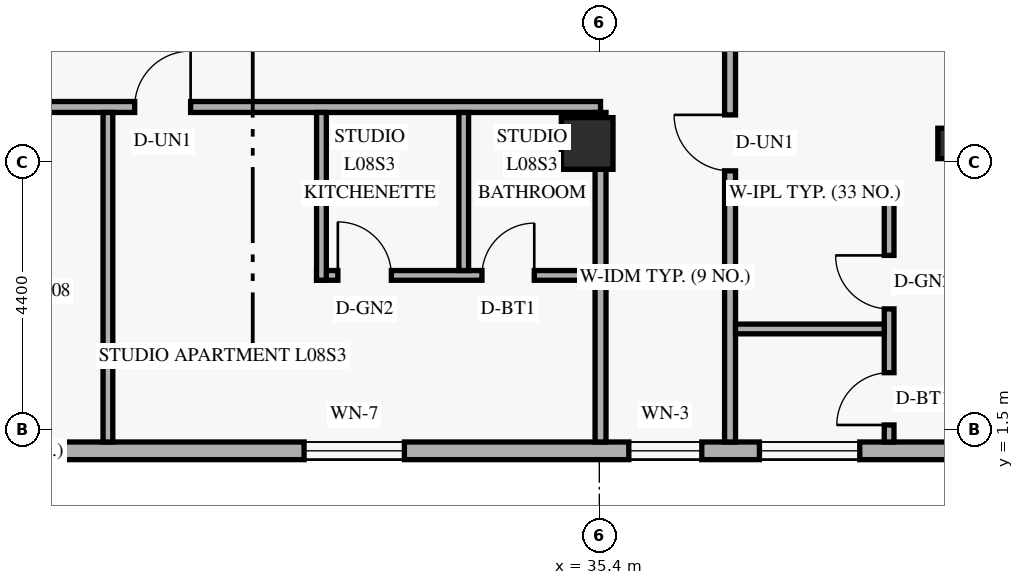
"""IFC4 building model, lengths in metres.
Left out: names, types, materials, properties, quantities, classifications, styles, units other than length and angle.
Written with IfcOpenShell. Run it as: python <this file> out.ifc"""

import sys

from ifc_helpers import new_model, si_unit, direction, frame, frame_2d, origin, origin_2d, place, context, subcontext, project, spatial, rectangle, hollow_rectangle, extrude, element, fill, save


model = new_model("IFC4")
c1 = context("Model", 3, precision=1e-05, world=origin(), true_north=direction((0.0, 1.0)))
c2 = subcontext(c1, "Body", "Model", "MODEL_VIEW")
j1 = project(units=[si_unit("LENGTHUNIT", "METRE"), si_unit("PLANEANGLEUNIT", "RADIAN")], contexts=[c1])
p1 = place(None, origin())
s1 = spatial("IfcSite", under=j1, at=p1, CompositionType="ELEMENT")
p2 = place(p1, origin())
s2 = spatial("IfcBuilding", under=s1, at=p2, CompositionType="ELEMENT")
p3 = place(p2, frame((0.0, 0.0, 34.8)))
s3 = spatial("IfcBuildingStorey", under=s2, at=p3, CompositionType="ELEMENT", Elevation=34.8)
p4 = place(p3, frame((35.2, 6.2, 0.0), z_axis=(0.0, 0.0, 1.0), x_axis=(1.0, 0.0, 0.0)))
e1 = element("IfcColumn", 1, at=p4, inside=s3, PredefinedType="COLUMN", context=c2, shape_type="SweptSolid", body=[
    extrude(rectangle(XDim=0.85, YDim=0.85, at=origin_2d()), origin(), (0.0, 0.0, 1.0), 3.6),
])
p5 = place(p3, frame((41.154, 6.2, 0.0), z_axis=(0.034973505036, 0.0, 0.999388239847), x_axis=(0.0, 1.0, 0.0)))
e2 = element("IfcColumn", 2, at=p5, inside=s3, PredefinedType="COLUMN", context=c2, shape_type="SweptSolid", body=[
    extrude(hollow_rectangle(XDim=0.5, YDim=0.5, WallThickness=0.022, at=origin_2d()), origin(), (0.0, 0.0, 1.0), 3.602),
])
p6 = place(p3, frame((5.42, 1.145, 0.0), z_axis=(0.0, 0.0, 1.0), x_axis=(1.0, 0.0, 0.0)))
e3 = element("IfcWall", 3, at=p6, inside=s3, PredefinedType="SOLIDWALL", context=c2, shape_type="SweptSolid", body=[
    extrude(rectangle(XDim=39.56, YDim=0.29, at=frame_2d((19.78, 0.0))), origin(), (0.0, 0.0, 1.0), 3.36),
])
p7 = place(p6, frame((2.615, 0.0, 0.85)))
e4 = element("IfcOpeningElement", 4, at=p7, cuts=e3, PredefinedType="OPENING", context=c2, shape_type="SweptSolid", body=[
    extrude(rectangle(XDim=1.65, YDim=1.6, at=frame_2d((0.825, 0.8))), frame((0.0, 0.155, 0.0), z_axis=(0.0, -1.0, 0.0), x_axis=(1.0, 0.0, 0.0)), (0.0, 0.0, 1.0), 0.31),
])
p8 = place(p6, frame((7.18, 0.0, 0.85)))
e5 = element("IfcOpeningElement", 5, at=p8, cuts=e3, PredefinedType="OPENING", context=c2, shape_type="SweptSolid", body=[
    extrude(rectangle(XDim=1.2, YDim=1.5, at=frame_2d((0.6, 0.75))), frame((0.0, 0.155, 0.0), z_axis=(0.0, -1.0, 0.0), x_axis=(1.0, 0.0, 0.0)), (0.0, 0.0, 1.0), 0.31),
])
p9 = place(p6, frame((11.906, 0.0, 0.85)))
e6 = element("IfcOpeningElement", 6, at=p9, cuts=e3, PredefinedType="OPENING", context=c2, shape_type="SweptSolid", body=[
    extrude(rectangle(XDim=1.65, YDim=1.6, at=frame_2d((0.825, 0.8))), frame((0.0, 0.155, 0.0), z_axis=(0.0, -1.0, 0.0), x_axis=(1.0, 0.0, 0.0)), (0.0, 0.0, 1.0), 0.31),
])
p10 = place(p6, frame((18.515, 0.0, 0.85)))
e7 = element("IfcOpeningElement", 7, at=p10, cuts=e3, PredefinedType="OPENING", context=c2, shape_type="SweptSolid", body=[
    extrude(rectangle(XDim=1.65, YDim=1.6, at=frame_2d((0.825, 0.8))), frame((0.0, 0.155, 0.0), z_axis=(0.0, -1.0, 0.0), x_axis=(1.0, 0.0, 0.0)), (0.0, 0.0, 1.0), 0.31),
])
p11 = place(p6, frame((25.124, 0.0, 0.85)))
e8 = element("IfcOpeningElement", 8, at=p11, cuts=e3, PredefinedType="OPENING", context=c2, shape_type="SweptSolid", body=[
    extrude(rectangle(XDim=1.65, YDim=1.6, at=frame_2d((0.825, 0.8))), frame((0.0, 0.155, 0.0), z_axis=(0.0, -1.0, 0.0), x_axis=(1.0, 0.0, 0.0)), (0.0, 0.0, 1.0), 0.31),
])
p12 = place(p6, frame((30.465, 0.0, 0.85)))
e9 = element("IfcOpeningElement", 9, at=p12, cuts=e3, PredefinedType="OPENING", context=c2, shape_type="SweptSolid", body=[
    extrude(rectangle(XDim=1.2, YDim=1.5, at=frame_2d((0.6, 0.75))), frame((0.0, 0.155, 0.0), z_axis=(0.0, -1.0, 0.0), x_axis=(1.0, 0.0, 0.0)), (0.0, 0.0, 1.0), 0.31),
])
p13 = place(p6, frame((32.613, 0.0, 0.85)))
e10 = element("IfcOpeningElement", 10, at=p13, cuts=e3, PredefinedType="OPENING", context=c2, shape_type="SweptSolid", body=[
    extrude(rectangle(XDim=1.65, YDim=1.6, at=frame_2d((0.825, 0.8))), frame((0.0, 0.155, 0.0), z_axis=(0.0, -1.0, 0.0), x_axis=(1.0, 0.0, 0.0)), (0.0, 0.0, 1.0), 0.31),
])
p14 = place(p6, frame((36.328, 0.0, 0.85)))
e11 = element("IfcOpeningElement", 11, at=p14, cuts=e3, PredefinedType="OPENING", context=c2, shape_type="SweptSolid", body=[
    extrude(rectangle(XDim=1.65, YDim=1.6, at=frame_2d((0.825, 0.8))), frame((0.0, 0.155, 0.0), z_axis=(0.0, -1.0, 0.0), x_axis=(1.0, 0.0, 0.0)), (0.0, 0.0, 1.0), 0.31),
])
p15 = place(p3, frame((37.55, 1.29, 0.0), z_axis=(0.0, 0.0, 1.0), x_axis=(0.0, 1.0, 0.0)))
e12 = element("IfcWall", 12, at=p15, inside=s3, PredefinedType="STANDARD", context=c2, shape_type="SweptSolid", body=[
    extrude(rectangle(XDim=45.42, YDim=0.18, at=frame_2d((22.71, 0.0))), origin(), (0.0, 0.0, 1.0), 2.649),
])
p16 = place(p15, frame((4.46, 0.0, 0.0)))
e13 = element("IfcOpeningElement", 13, at=p16, cuts=e12, PredefinedType="OPENING", context=c2, shape_type="SweptSolid", body=[
    extrude(rectangle(XDim=0.92, YDim=2.15, at=frame_2d((0.46, 1.075))), frame((0.0, 0.1, 0.0), z_axis=(0.0, -1.0, 0.0), x_axis=(1.0, 0.0, 0.0)), (0.0, 0.0, 1.0), 0.2),
])
p17 = place(p15, frame((15.907, 0.0, 0.0)))
e14 = element("IfcOpeningElement", 14, at=p17, cuts=e12, PredefinedType="OPENING", context=c2, shape_type="SweptSolid", body=[
    extrude(rectangle(XDim=0.92, YDim=2.15, at=frame_2d((0.46, 1.075))), frame((0.0, 0.1, 0.0), z_axis=(0.0, -1.0, 0.0), x_axis=(1.0, 0.0, 0.0)), (0.0, 0.0, 1.0), 0.2),
])
p18 = place(p15, frame((28.23, 0.0, 0.0)))
e15 = element("IfcOpeningElement", 15, at=p18, cuts=e12, PredefinedType="OPENING", context=c2, shape_type="SweptSolid", body=[
    extrude(rectangle(XDim=0.92, YDim=2.15, at=frame_2d((0.46, 1.075))), frame((0.0, 0.1, 0.0), z_axis=(0.0, -1.0, 0.0), x_axis=(1.0, 0.0, 0.0)), (0.0, 0.0, 1.0), 0.2),
])
p19 = place(p15, frame((40.02, 0.0, 0.0)))
e16 = element("IfcOpeningElement", 16, at=p19, cuts=e12, PredefinedType="OPENING", context=c2, shape_type="SweptSolid", body=[
    extrude(rectangle(XDim=0.92, YDim=2.15, at=frame_2d((0.46, 1.075))), frame((0.0, 0.1, 0.0), z_axis=(0.0, -1.0, 0.0), x_axis=(1.0, 0.0, 0.0)), (0.0, 0.0, 1.0), 0.2),
])
p20 = place(p3, frame((14.1, 6.8, 0.0), z_axis=(0.0, 0.0, 1.0), x_axis=(1.0, 0.0, 0.0)))
e17 = element("IfcWall", 17, at=p20, inside=s3, PredefinedType="STANDARD", context=c2, shape_type="SweptSolid", body=[
    extrude(rectangle(XDim=21.32, YDim=0.18, at=frame_2d((10.66, 0.0))), origin(), (0.0, 0.0, 1.0), 2.649),
])
p21 = place(p20, frame((0.44, 0.0, 0.0)))
e18 = element("IfcOpeningElement", 18, at=p21, cuts=e17, PredefinedType="OPENING", context=c2, shape_type="SweptSolid", body=[
    extrude(rectangle(XDim=0.92, YDim=2.15, at=frame_2d((0.46, 1.075))), frame((0.0, 0.1, 0.0), z_axis=(0.0, -1.0, 0.0), x_axis=(1.0, 0.0, 0.0)), (0.0, 0.0, 1.0), 0.2),
])
p22 = place(p20, frame((8.582, 0.0, 0.0)))
e19 = element("IfcOpeningElement", 19, at=p22, cuts=e17, PredefinedType="OPENING", context=c2, shape_type="SweptSolid", body=[
    extrude(rectangle(XDim=0.95, YDim=2.15, at=frame_2d((0.475, 1.075))), frame((0.0, 0.1, 0.0), z_axis=(0.0, -1.0, 0.0), x_axis=(1.0, 0.0, 0.0)), (0.0, 0.0, 1.0), 0.2),
])
p23 = place(p20, frame((13.658, 0.0, 0.0)))
e20 = element("IfcOpeningElement", 20, at=p23, cuts=e17, PredefinedType="OPENING", context=c2, shape_type="SweptSolid", body=[
    extrude(rectangle(XDim=0.92, YDim=2.15, at=frame_2d((0.46, 1.075))), frame((0.0, 0.1, 0.0), z_axis=(0.0, -1.0, 0.0), x_axis=(1.0, 0.0, 0.0)), (0.0, 0.0, 1.0), 0.2),
])
p24 = place(p3, frame((35.42, 1.29, 0.0), z_axis=(0.0, 0.0, 1.0), x_axis=(0.0, 1.0, 0.0)))
e21 = element("IfcWall", 21, at=p24, inside=s3, PredefinedType="PARTITIONING", context=c2, shape_type="SweptSolid", body=[
    extrude(rectangle(XDim=5.42, YDim=0.18, at=frame_2d((2.71, 0.0))), origin(), (0.0, 0.0, 1.0), 3.36),
])
p25 = place(p3, frame((37.64, 5.39, 0.0), z_axis=(0.0, 0.0, 1.0), x_axis=(1.0, 0.0, 0.0)))
e22 = element("IfcWall", 22, at=p25, inside=s3, PredefinedType="PLUMBINGWALL", context=c2, shape_type="SweptSolid", body=[
    extrude(rectangle(XDim=2.606, YDim=0.16, at=frame_2d((1.303, 0.0))), origin(), (0.0, 0.0, 1.0), 3.36),
])
p26 = place(p3, frame((40.166, 1.29, 0.0), z_axis=(0.0, 0.0, 1.0), x_axis=(0.0, 1.0, 0.0)))
e23 = element("IfcWall", 23, at=p26, inside=s3, PredefinedType="PLUMBINGWALL", context=c2, shape_type="SweptSolid", body=[
    extrude(rectangle(XDim=4.19, YDim=0.16, at=frame_2d((2.095, 0.0))), origin(), (0.0, 0.0, 1.0), 3.36),
])
p27 = place(p26, frame((0.28, 0.0, 0.0)))
e24 = element("IfcOpeningElement", 24, at=p27, cuts=e23, PredefinedType="OPENING", context=c2, shape_type="SweptSolid", body=[
    extrude(rectangle(XDim=0.86, YDim=2.12, at=frame_2d((0.43, 1.06))), frame((0.0, 0.09, 0.0), z_axis=(0.0, -1.0, 0.0), x_axis=(1.0, 0.0, 0.0)), (0.0, 0.0, 1.0), 0.18),
])
p28 = place(p26, frame((2.189, 0.0, 0.0)))
e25 = element("IfcOpeningElement", 25, at=p28, cuts=e23, PredefinedType="OPENING", context=c2, shape_type="SweptSolid", body=[
    extrude(rectangle(XDim=0.88, YDim=2.12, at=frame_2d((0.44, 1.06))), frame((0.0, 0.09, 0.0), z_axis=(0.0, -1.0, 0.0), x_axis=(1.0, 0.0, 0.0)), (0.0, 0.0, 1.0), 0.18),
])
p29 = place(p3, frame((37.64, 3.149, 0.0), z_axis=(0.0, 0.0, 1.0), x_axis=(1.0, 0.0, 0.0)))
e26 = element("IfcWall", 26, at=p29, inside=s3, PredefinedType="PLUMBINGWALL", context=c2, shape_type="SweptSolid", body=[
    extrude(rectangle(XDim=2.446, YDim=0.16, at=frame_2d((1.223, 0.0))), origin(), (0.0, 0.0, 1.0), 3.36),
])
p30 = place(p3, frame((27.318, 1.29, 0.0), z_axis=(0.0, 0.0, 1.0), x_axis=(0.0, 1.0, 0.0)))
e27 = element("IfcWall", 27, at=p30, inside=s3, PredefinedType="PARTITIONING", context=c2, shape_type="SweptSolid", body=[
    extrude(rectangle(XDim=5.42, YDim=0.16, at=frame_2d((2.71, 0.0))), origin(), (0.0, 0.0, 1.0), 2.809),
])
p31 = place(p3, frame((30.75, 4.03, 0.0), z_axis=(0.0, 0.0, 1.0), x_axis=(1.0, 0.0, 0.0)))
e28 = element("IfcWall", 28, at=p31, inside=s3, PredefinedType="PLUMBINGWALL", context=c2, shape_type="SweptSolid", body=[
    extrude(rectangle(XDim=4.58, YDim=0.16, at=frame_2d((2.29, 0.0))), origin(), (0.0, 0.0, 1.0), 3.36),
])
p32 = place(p31, frame((0.35, 0.0, 0.0)))
e29 = element("IfcOpeningElement", 29, at=p32, cuts=e28, PredefinedType="OPENING", context=c2, shape_type="SweptSolid", body=[
    extrude(rectangle(XDim=0.88, YDim=2.12, at=frame_2d((0.44, 1.06))), frame((0.0, 0.09, 0.0), z_axis=(0.0, -1.0, 0.0), x_axis=(1.0, 0.0, 0.0)), (0.0, 0.0, 1.0), 0.18),
])
p33 = place(p31, frame((2.72, 0.0, 0.0)))
e30 = element("IfcOpeningElement", 30, at=p33, cuts=e28, PredefinedType="OPENING", context=c2, shape_type="SweptSolid", body=[
    extrude(rectangle(XDim=0.86, YDim=2.12, at=frame_2d((0.43, 1.06))), frame((0.0, 0.09, 0.0), z_axis=(0.0, -1.0, 0.0), x_axis=(1.0, 0.0, 0.0)), (0.0, 0.0, 1.0), 0.18),
])
p34 = place(p3, frame((30.83, 3.95, 0.0), z_axis=(0.0, 0.0, 1.0), x_axis=(0.0, 1.0, 0.0)))
e31 = element("IfcWall", 31, at=p34, inside=s3, PredefinedType="PLUMBINGWALL", context=c2, shape_type="SweptSolid", body=[
    extrude(rectangle(XDim=2.76, YDim=0.16, at=frame_2d((1.38, 0.0))), origin(), (0.0, 0.0, 1.0), 2.809),
])
p35 = place(p3, frame((33.17, 4.11, 0.0), z_axis=(0.0, 0.0, 1.0), x_axis=(0.0, 1.0, 0.0)))
e32 = element("IfcWall", 32, at=p35, inside=s3, PredefinedType="PLUMBINGWALL", context=c2, shape_type="SweptSolid", body=[
    extrude(rectangle(XDim=2.6, YDim=0.16, at=frame_2d((1.3, 0.0))), origin(), (0.0, 0.0, 1.0), 2.809),
])
p36 = place(p11, origin())
e33 = element("IfcWindow", 33, at=p36, inside=s3, PartitioningType="SINGLE_PANEL", PredefinedType="WINDOW", context=c2, shape_type="SweptSolid", body=[
    extrude(rectangle(XDim=1.65, YDim=1.6, at=frame_2d((0.825, 0.8))), frame((0.0, 0.03, 0.0), z_axis=(0.0, -1.0, 0.0), x_axis=(1.0, 0.0, 0.0)), (0.0, 0.0, 1.0), 0.06),
])
fill(e8, e33)
p37 = place(p12, origin())
e34 = element("IfcWindow", 34, at=p37, inside=s3, PartitioningType="SINGLE_PANEL", PredefinedType="WINDOW", context=c2, shape_type="SweptSolid", body=[
    extrude(rectangle(XDim=1.2, YDim=1.5, at=frame_2d((0.6, 0.75))), frame((0.0, 0.03, 0.0), z_axis=(0.0, -1.0, 0.0), x_axis=(1.0, 0.0, 0.0)), (0.0, 0.0, 1.0), 0.06),
])
fill(e9, e34)
p38 = place(p13, origin())
e35 = element("IfcWindow", 35, at=p38, inside=s3, PartitioningType="SINGLE_PANEL", PredefinedType="WINDOW", context=c2, shape_type="SweptSolid", body=[
    extrude(rectangle(XDim=1.65, YDim=1.6, at=frame_2d((0.825, 0.8))), frame((0.0, 0.03, 0.0), z_axis=(0.0, -1.0, 0.0), x_axis=(1.0, 0.0, 0.0)), (0.0, 0.0, 1.0), 0.06),
])
fill(e10, e35)
p39 = place(p16, origin())
e36 = element("IfcDoor", 36, at=p39, inside=s3, OperationType="SINGLE_SWING_RIGHT", PredefinedType="DOOR", context=c2, shape_type="SweptSolid", body=[
    extrude(rectangle(XDim=0.92, YDim=2.15, at=frame_2d((0.46, 1.075))), frame((0.0, 0.025, 0.0), z_axis=(0.0, -1.0, 0.0), x_axis=(1.0, 0.0, 0.0)), (0.0, 0.0, 1.0), 0.05),
])
fill(e13, e36)
p40 = place(p27, origin())
e37 = element("IfcDoor", 37, at=p40, inside=s3, OperationType="SINGLE_SWING_LEFT", PredefinedType="DOOR", context=c2, shape_type="SweptSolid", body=[
    extrude(rectangle(XDim=0.86, YDim=2.12, at=frame_2d((0.43, 1.06))), frame((0.0, 0.025, 0.0), z_axis=(0.0, -1.0, 0.0), x_axis=(1.0, 0.0, 0.0)), (0.0, 0.0, 1.0), 0.05),
])
fill(e24, e37)
p41 = place(p28, origin())
e38 = element("IfcDoor", 38, at=p41, inside=s3, OperationType="SINGLE_SWING_RIGHT", PredefinedType="DOOR", context=c2, shape_type="SweptSolid", body=[
    extrude(rectangle(XDim=0.88, YDim=2.12, at=frame_2d((0.44, 1.06))), frame((0.0, 0.025, 0.0), z_axis=(0.0, -1.0, 0.0), x_axis=(1.0, 0.0, 0.0)), (0.0, 0.0, 1.0), 0.05),
])
fill(e25, e38)
p42 = place(p23, origin())
e39 = element("IfcDoor", 39, at=p42, inside=s3, OperationType="SINGLE_SWING_RIGHT", PredefinedType="DOOR", context=c2, shape_type="SweptSolid", body=[
    extrude(rectangle(XDim=0.92, YDim=2.15, at=frame_2d((0.46, 1.075))), frame((0.0, 0.025, 0.0), z_axis=(0.0, -1.0, 0.0), x_axis=(1.0, 0.0, 0.0)), (0.0, 0.0, 1.0), 0.05),
])
fill(e20, e39)
p43 = place(p32, origin())
e40 = element("IfcDoor", 40, at=p43, inside=s3, OperationType="SINGLE_SWING_LEFT", PredefinedType="DOOR", context=c2, shape_type="SweptSolid", body=[
    extrude(rectangle(XDim=0.88, YDim=2.12, at=frame_2d((0.44, 1.06))), frame((0.0, 0.025, 0.0), z_axis=(0.0, -1.0, 0.0), x_axis=(1.0, 0.0, 0.0)), (0.0, 0.0, 1.0), 0.05),
])
fill(e29, e40)
p44 = place(p33, origin())
e41 = element("IfcDoor", 41, at=p44, inside=s3, OperationType="SINGLE_SWING_RIGHT", PredefinedType="DOOR", context=c2, shape_type="SweptSolid", body=[
    extrude(rectangle(XDim=0.86, YDim=2.12, at=frame_2d((0.43, 1.06))), frame((0.0, 0.025, 0.0), z_axis=(0.0, -1.0, 0.0), x_axis=(1.0, 0.0, 0.0)), (0.0, 0.0, 1.0), 0.05),
])
fill(e30, e41)
save(model, sys.argv[1])
